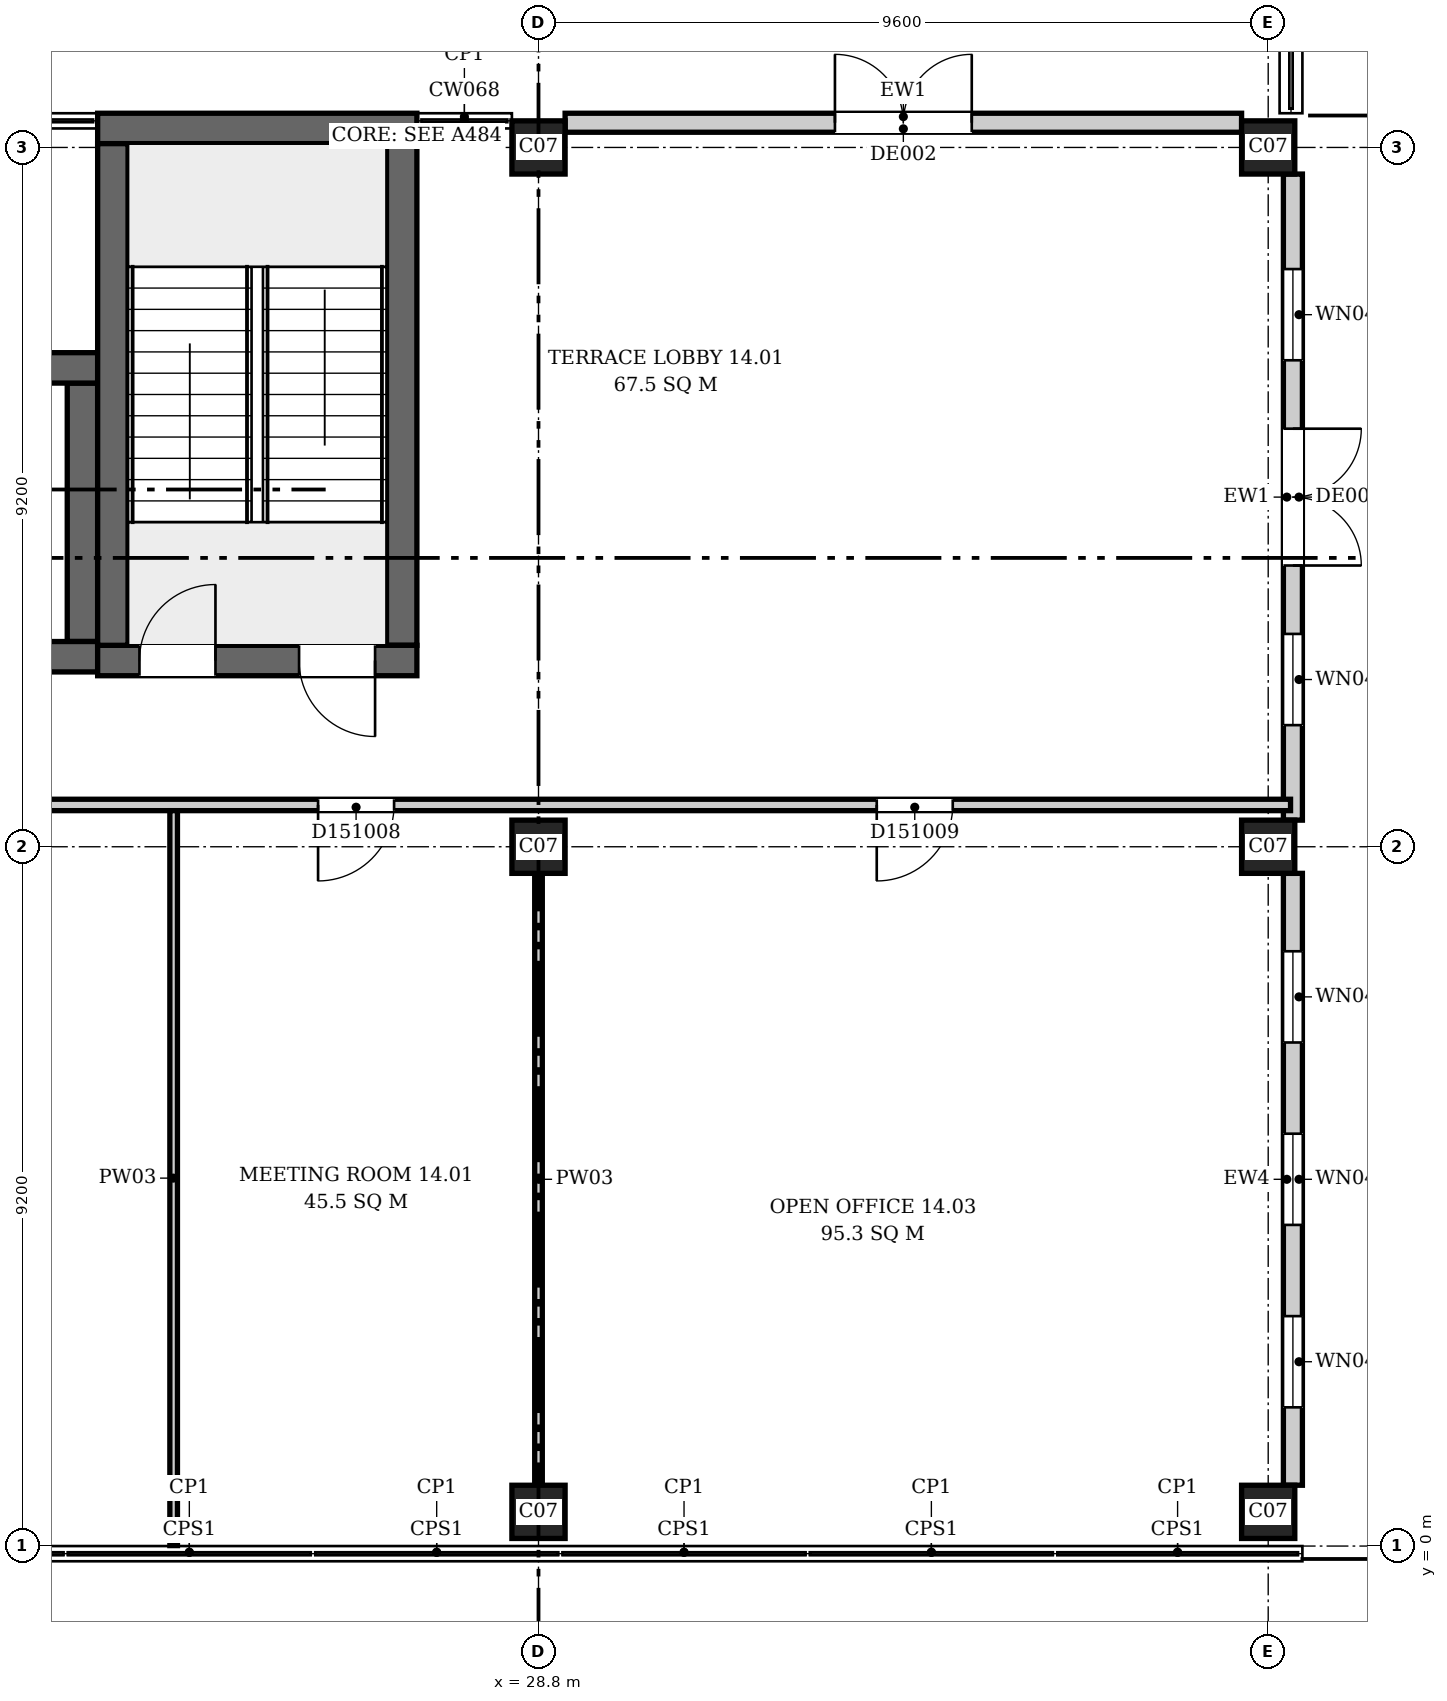
"""IFC4 building model, lengths in metres.
Left out: names, types, materials, properties, quantities, classifications, styles, units other than length and angle.
Written with IfcOpenShell. Run it as: python <this file> out.ifc"""

import sys

from ifc_helpers import new_model, si_unit, direction, frame, frame_2d, origin, origin_2d, place, context, subcontext, project, spatial, rectangle, extrude, element, fill, save


model = new_model("IFC4")
c1 = context("Model", 3, precision=1e-05, world=origin(), true_north=direction((0.0, 1.0)))
c2 = subcontext(c1, "Body", "Model", "MODEL_VIEW")
j1 = project(units=[si_unit("LENGTHUNIT", "METRE"), si_unit("PLANEANGLEUNIT", "RADIAN")], contexts=[c1])
p1 = place(None, origin())
s1 = spatial("IfcSite", under=j1, at=p1, CompositionType="ELEMENT")
p2 = place(p1, origin())
s2 = spatial("IfcBuilding", under=s1, at=p2, CompositionType="ELEMENT")
p3 = place(p2, frame((0.0, 0.0, 69.7)))
s3 = spatial("IfcBuildingStorey", under=s2, at=p3, CompositionType="ELEMENT", Elevation=69.7)
p4 = place(p3, frame((23.0, 11.65, 0.0), z_axis=(0.0, 0.0, 1.0), x_axis=(1.0, 0.0, 0.0)))
e1 = element("IfcWall", 1, at=p4, inside=s3, PredefinedType="SHEAR", context=c2, shape_type="SweptSolid", body=[
    extrude(rectangle(XDim=4.2, YDim=0.4, at=frame_2d((2.1, 0.0))), origin(), (0.0, 0.0, 1.0), 4.2),
])
p5 = place(p4, frame((0.55, 0.0, 0.0)))
e2 = element("IfcOpeningElement", 2, at=p5, cuts=e1, PredefinedType="OPENING", context=c2, shape_type="SweptSolid", body=[
    extrude(rectangle(XDim=1.0, YDim=2.1, at=frame_2d((0.5, 1.05))), frame((0.0, 0.21, 0.0), z_axis=(0.0, -1.0, 0.0), x_axis=(1.0, 0.0, 0.0)), (0.0, 0.0, 1.0), 0.42),
])
p6 = place(p4, frame((2.65, 0.0, 0.0)))
e3 = element("IfcOpeningElement", 3, at=p6, cuts=e1, PredefinedType="OPENING", context=c2, shape_type="SweptSolid", body=[
    extrude(rectangle(XDim=1.0, YDim=2.1, at=frame_2d((0.5, 1.05))), frame((0.0, 0.21, 0.0), z_axis=(0.0, -1.0, 0.0), x_axis=(1.0, 0.0, 0.0)), (0.0, 0.0, 1.0), 0.42),
])
p7 = place(p3, frame((23.0, 18.65, 0.0), z_axis=(0.0, 0.0, 1.0), x_axis=(1.0, 0.0, 0.0)))
e4 = element("IfcWall", 4, at=p7, inside=s3, PredefinedType="SHEAR", context=c2, shape_type="SweptSolid", body=[
    extrude(rectangle(XDim=4.2, YDim=0.4, at=frame_2d((2.1, 0.0))), origin(), (0.0, 0.0, 1.0), 4.2),
])
for number, where, z_axis, x_axis in (
    (5, (23.2, 11.85, 0.0), (0.0, 0.0, 1.0), (0.0, 1.0, 0.0)),
    (6, (27.0, 11.85, 0.0), (0.0, 0.0, 1.0), (0.0, 1.0, 0.0)),
):
    element("IfcWall", number, at=place(p3, frame(where, z_axis=z_axis, x_axis=x_axis)), inside=s3, PredefinedType="SHEAR", context=c2, shape_type="SweptSolid", body=[
        extrude(rectangle(XDim=6.6, YDim=0.4, at=frame_2d((3.3, 0.0))), origin(), (0.0, 0.0, 1.0), 4.2),
    ])
p8 = place(p3, frame((19.9, 11.7, 0.0), z_axis=(0.0, 0.0, 1.0), x_axis=(1.0, 0.0, 0.0)))
e7 = element("IfcWall", 7, at=p8, inside=s3, PredefinedType="SHEAR", context=c2, shape_type="SweptSolid", body=[
    extrude(rectangle(XDim=3.1, YDim=0.4, at=frame_2d((1.55, 0.0))), origin(), (0.0, 0.0, 1.0), 4.2),
])
p9 = place(p3, frame((19.9, 15.5, 0.0), z_axis=(0.0, 0.0, 1.0), x_axis=(1.0, 0.0, 0.0)))
e8 = element("IfcWall", 8, at=p9, inside=s3, PredefinedType="SHEAR", context=c2, shape_type="SweptSolid", body=[
    extrude(rectangle(XDim=3.1, YDim=0.4, at=frame_2d((1.55, 0.0))), origin(), (0.0, 0.0, 1.0), 4.2),
])
p10 = place(p9, frame((0.95, 0.0, 0.0)))
e9 = element("IfcOpeningElement", 9, at=p10, cuts=e8, PredefinedType="OPENING", context=c2, shape_type="SweptSolid", body=[
    extrude(rectangle(XDim=1.2, YDim=2.1, at=frame_2d((0.6, 1.05))), frame((0.0, 0.21, 0.0), z_axis=(0.0, -1.0, 0.0), x_axis=(1.0, 0.0, 0.0)), (0.0, 0.0, 1.0), 0.42),
])
p11 = place(p3, frame((22.8, 11.9, 0.0), z_axis=(0.0, 0.0, 1.0), x_axis=(0.0, 1.0, 0.0)))
e10 = element("IfcWall", 10, at=p11, inside=s3, PredefinedType="SHEAR", context=c2, shape_type="SweptSolid", body=[
    extrude(rectangle(XDim=3.4, YDim=0.4, at=frame_2d((1.7, 0.0))), origin(), (0.0, 0.0, 1.0), 4.2),
])
for number, where, z_axis, x_axis in (
    (11, (28.8, 0.45, 0.0), (0.0, 0.0, 1.0), (1.0, 0.0, 0.0)),
    (12, (38.4, 0.45, 0.0), (0.0, 0.0, 1.0), (1.0, 0.0, 0.0)),
    (13, (28.8, 9.2, 0.0), (0.0, 0.0, 1.0), (1.0, 0.0, 0.0)),
    (14, (38.4, 9.2, 0.0), (0.0, 0.0, 1.0), (1.0, 0.0, 0.0)),
    (15, (28.8, 18.4, 0.0), (0.0, 0.0, 1.0), (1.0, 0.0, 0.0)),
    (16, (38.4, 18.4, 0.0), (0.0, 0.0, 1.0), (1.0, 0.0, 0.0)),
):
    element("IfcColumn", number, at=place(p3, frame(where, z_axis=z_axis, x_axis=x_axis)), inside=s3, PredefinedType="COLUMN", context=c2, shape_type="SweptSolid", body=[
        extrude(rectangle(XDim=0.7, YDim=0.7, at=origin_2d()), origin(), (0.0, 0.0, 1.0), 4.2),
    ])
p12 = place(p3, frame((38.05, 18.725, 0.0), z_axis=(0.0, 0.0, 1.0), x_axis=(-1.0, 0.0, 0.0)))
e17 = element("IfcWall", 17, at=p12, inside=s3, PredefinedType="ELEMENTEDWALL", context=c2, shape_type="SweptSolid", body=[
    extrude(rectangle(XDim=8.9, YDim=0.25, at=frame_2d((4.45, 0.0))), origin(), (0.0, 0.0, 1.0), 3.9),
])
p13 = place(p12, frame((3.55, 0.0, 0.0)))
e18 = element("IfcOpeningElement", 18, at=p13, cuts=e17, PredefinedType="OPENING", context=c2, shape_type="SweptSolid", body=[
    extrude(rectangle(XDim=1.8, YDim=2.4, at=frame_2d((0.9, 1.2))), frame((0.0, 0.135, 0.0), z_axis=(0.0, -1.0, 0.0), x_axis=(1.0, 0.0, 0.0)), (0.0, 0.0, 1.0), 0.27),
])
p14 = place(p3, frame((38.725, 0.8, 0.0), z_axis=(0.0, 0.0, 1.0), x_axis=(0.0, 1.0, 0.0)))
e19 = element("IfcWall", 19, at=p14, inside=s3, PredefinedType="ELEMENTEDWALL", context=c2, shape_type="SweptSolid", body=[
    extrude(rectangle(XDim=8.05, YDim=0.25, at=frame_2d((4.025, 0.0))), origin(), (0.0, 0.0, 1.0), 3.9),
])
p15 = place(p14, frame((1.025, 0.0, 0.9)))
e20 = element("IfcOpeningElement", 20, at=p15, cuts=e19, PredefinedType="OPENING", context=c2, shape_type="SweptSolid", body=[
    extrude(rectangle(XDim=1.2, YDim=2.6, at=frame_2d((0.6, 1.3))), frame((0.0, 0.135, 0.0), z_axis=(0.0, -1.0, 0.0), x_axis=(1.0, 0.0, 0.0)), (0.0, 0.0, 1.0), 0.27),
])
p16 = place(p14, frame((3.425, 0.0, 0.9)))
e21 = element("IfcOpeningElement", 21, at=p16, cuts=e19, PredefinedType="OPENING", context=c2, shape_type="SweptSolid", body=[
    extrude(rectangle(XDim=1.2, YDim=2.6, at=frame_2d((0.6, 1.3))), frame((0.0, 0.135, 0.0), z_axis=(0.0, -1.0, 0.0), x_axis=(1.0, 0.0, 0.0)), (0.0, 0.0, 1.0), 0.27),
])
p17 = place(p14, frame((5.825, 0.0, 0.9)))
e22 = element("IfcOpeningElement", 22, at=p17, cuts=e19, PredefinedType="OPENING", context=c2, shape_type="SweptSolid", body=[
    extrude(rectangle(XDim=1.2, YDim=2.6, at=frame_2d((0.6, 1.3))), frame((0.0, 0.135, 0.0), z_axis=(0.0, -1.0, 0.0), x_axis=(1.0, 0.0, 0.0)), (0.0, 0.0, 1.0), 0.27),
])
p18 = place(p3, frame((38.725, 9.55, 0.0), z_axis=(0.0, 0.0, 1.0), x_axis=(0.0, 1.0, 0.0)))
e23 = element("IfcWall", 23, at=p18, inside=s3, PredefinedType="ELEMENTEDWALL", context=c2, shape_type="SweptSolid", body=[
    extrude(rectangle(XDim=8.5, YDim=0.25, at=frame_2d((4.25, 0.0))), origin(), (0.0, 0.0, 1.0), 3.9),
])
p19 = place(p18, frame((3.35, 0.0, 0.0)))
e24 = element("IfcOpeningElement", 24, at=p19, cuts=e23, PredefinedType="OPENING", context=c2, shape_type="SweptSolid", body=[
    extrude(rectangle(XDim=1.8, YDim=2.4, at=frame_2d((0.9, 1.2))), frame((0.0, 0.135, 0.0), z_axis=(0.0, -1.0, 0.0), x_axis=(1.0, 0.0, 0.0)), (0.0, 0.0, 1.0), 0.27),
])
p20 = place(p18, frame((1.25, 0.0, 0.9)))
e25 = element("IfcOpeningElement", 25, at=p20, cuts=e23, PredefinedType="OPENING", context=c2, shape_type="SweptSolid", body=[
    extrude(rectangle(XDim=1.2, YDim=2.6, at=frame_2d((0.6, 1.3))), frame((0.0, 0.135, 0.0), z_axis=(0.0, -1.0, 0.0), x_axis=(1.0, 0.0, 0.0)), (0.0, 0.0, 1.0), 0.27),
])
p21 = place(p18, frame((6.05, 0.0, 0.9)))
e26 = element("IfcOpeningElement", 26, at=p21, cuts=e23, PredefinedType="OPENING", context=c2, shape_type="SweptSolid", body=[
    extrude(rectangle(XDim=1.2, YDim=2.6, at=frame_2d((0.6, 1.3))), frame((0.0, 0.135, 0.0), z_axis=(0.0, -1.0, 0.0), x_axis=(1.0, 0.0, 0.0)), (0.0, 0.0, 1.0), 0.27),
])
p22 = place(p3, frame((4.325, 9.75, 0.0), z_axis=(0.0, 0.0, 1.0), x_axis=(1.0, 0.0, 0.0)))
e27 = element("IfcWall", 27, at=p22, inside=s3, PredefinedType="PARTITIONING", context=c2, shape_type="SweptSolid", body=[
    extrude(rectangle(XDim=34.369, YDim=0.15, at=frame_2d((17.185, 0.0))), origin(), (0.0, 0.0, 1.0), 3.9),
])
p23 = place(p22, frame((2.175, 0.0, 0.0)))
e28 = element("IfcOpeningElement", 28, at=p23, cuts=e27, PredefinedType="OPENING", context=c2, shape_type="SweptSolid", body=[
    extrude(rectangle(XDim=1.0, YDim=2.1, at=frame_2d((0.5, 1.05))), frame((0.0, 0.085, 0.0), z_axis=(0.0, -1.0, 0.0), x_axis=(1.0, 0.0, 0.0)), (0.0, 0.0, 1.0), 0.17),
])
p24 = place(p22, frame((11.975, 0.0, 0.0)))
e29 = element("IfcOpeningElement", 29, at=p24, cuts=e27, PredefinedType="OPENING", context=c2, shape_type="SweptSolid", body=[
    extrude(rectangle(XDim=1.0, YDim=2.1, at=frame_2d((0.5, 1.05))), frame((0.0, 0.085, 0.0), z_axis=(0.0, -1.0, 0.0), x_axis=(1.0, 0.0, 0.0)), (0.0, 0.0, 1.0), 0.17),
])
p25 = place(p22, frame((21.575, 0.0, 0.0)))
e30 = element("IfcOpeningElement", 30, at=p25, cuts=e27, PredefinedType="OPENING", context=c2, shape_type="SweptSolid", body=[
    extrude(rectangle(XDim=1.0, YDim=2.1, at=frame_2d((0.5, 1.05))), frame((0.0, 0.085, 0.0), z_axis=(0.0, -1.0, 0.0), x_axis=(1.0, 0.0, 0.0)), (0.0, 0.0, 1.0), 0.17),
])
p26 = place(p22, frame((28.925, 0.0, 0.0)))
e31 = element("IfcOpeningElement", 31, at=p26, cuts=e27, PredefinedType="OPENING", context=c2, shape_type="SweptSolid", body=[
    extrude(rectangle(XDim=1.0, YDim=2.1, at=frame_2d((0.5, 1.05))), frame((0.0, 0.085, 0.0), z_axis=(0.0, -1.0, 0.0), x_axis=(1.0, 0.0, 0.0)), (0.0, 0.0, 1.0), 0.17),
])
p27 = place(p3, frame((24.0, 0.006, 0.0), z_axis=(0.0, 0.0, 1.0), x_axis=(0.0, 1.0, 0.0)))
e32 = element("IfcWall", 32, at=p27, inside=s3, PredefinedType="PARTITIONING", context=c2, shape_type="SweptSolid", body=[
    extrude(rectangle(XDim=9.669, YDim=0.1, at=frame_2d((4.834, 0.0))), origin(), (0.0, 0.0, 1.0), 3.9),
])
p28 = place(p3, frame((28.8, 0.8, 0.0), z_axis=(0.0, 0.0, 1.0), x_axis=(0.0, 1.0, 0.0)))
e33 = element("IfcWall", 33, at=p28, inside=s3, PredefinedType="PARTITIONING", context=c2, shape_type="SweptSolid", body=[
    extrude(rectangle(XDim=8.05, YDim=0.1, at=frame_2d((4.025, 0.0))), origin(), (0.0, 0.0, 1.0), 3.9),
])
p29 = place(p13, frame((1.8, 0.0, 0.0), z_axis=(0.0, 0.0, 1.0), x_axis=(-1.0, 0.0, 0.0)))
e34 = element("IfcDoor", 34, at=p29, inside=s3, OperationType="DOUBLE_DOOR_SINGLE_SWING", PredefinedType="DOOR", context=c2, shape_type="SweptSolid", body=[
    extrude(rectangle(XDim=1.8, YDim=2.4, at=frame_2d((0.9, 1.2))), frame((0.0, 0.025, 0.0), z_axis=(0.0, -1.0, 0.0), x_axis=(1.0, 0.0, 0.0)), (0.0, 0.0, 1.0), 0.05),
])
fill(e18, e34)
p30 = place(p15, origin())
e35 = element("IfcWindow", 35, at=p30, inside=s3, PartitioningType="SINGLE_PANEL", PredefinedType="WINDOW", context=c2, shape_type="SweptSolid", body=[
    extrude(rectangle(XDim=1.2, YDim=2.6, at=frame_2d((0.6, 1.3))), frame((0.0, 0.03, 0.0), z_axis=(0.0, -1.0, 0.0), x_axis=(1.0, 0.0, 0.0)), (0.0, 0.0, 1.0), 0.06),
])
fill(e20, e35)
p31 = place(p16, origin())
e36 = element("IfcWindow", 36, at=p31, inside=s3, PartitioningType="SINGLE_PANEL", PredefinedType="WINDOW", context=c2, shape_type="SweptSolid", body=[
    extrude(rectangle(XDim=1.2, YDim=2.6, at=frame_2d((0.6, 1.3))), frame((0.0, 0.03, 0.0), z_axis=(0.0, -1.0, 0.0), x_axis=(1.0, 0.0, 0.0)), (0.0, 0.0, 1.0), 0.06),
])
fill(e21, e36)
p32 = place(p17, origin())
e37 = element("IfcWindow", 37, at=p32, inside=s3, PartitioningType="SINGLE_PANEL", PredefinedType="WINDOW", context=c2, shape_type="SweptSolid", body=[
    extrude(rectangle(XDim=1.2, YDim=2.6, at=frame_2d((0.6, 1.3))), frame((0.0, 0.03, 0.0), z_axis=(0.0, -1.0, 0.0), x_axis=(1.0, 0.0, 0.0)), (0.0, 0.0, 1.0), 0.06),
])
fill(e22, e37)
p33 = place(p19, frame((1.8, 0.0, 0.0), z_axis=(0.0, 0.0, 1.0), x_axis=(-1.0, 0.0, 0.0)))
e38 = element("IfcDoor", 38, at=p33, inside=s3, OperationType="DOUBLE_DOOR_SINGLE_SWING", PredefinedType="DOOR", context=c2, shape_type="SweptSolid", body=[
    extrude(rectangle(XDim=1.8, YDim=2.4, at=frame_2d((0.9, 1.2))), frame((0.0, 0.025, 0.0), z_axis=(0.0, -1.0, 0.0), x_axis=(1.0, 0.0, 0.0)), (0.0, 0.0, 1.0), 0.05),
])
fill(e24, e38)
p34 = place(p20, origin())
e39 = element("IfcWindow", 39, at=p34, inside=s3, PartitioningType="SINGLE_PANEL", PredefinedType="WINDOW", context=c2, shape_type="SweptSolid", body=[
    extrude(rectangle(XDim=1.2, YDim=2.6, at=frame_2d((0.6, 1.3))), frame((0.0, 0.03, 0.0), z_axis=(0.0, -1.0, 0.0), x_axis=(1.0, 0.0, 0.0)), (0.0, 0.0, 1.0), 0.06),
])
fill(e25, e39)
p35 = place(p21, origin())
e40 = element("IfcWindow", 40, at=p35, inside=s3, PartitioningType="SINGLE_PANEL", PredefinedType="WINDOW", context=c2, shape_type="SweptSolid", body=[
    extrude(rectangle(XDim=1.2, YDim=2.6, at=frame_2d((0.6, 1.3))), frame((0.0, 0.03, 0.0), z_axis=(0.0, -1.0, 0.0), x_axis=(1.0, 0.0, 0.0)), (0.0, 0.0, 1.0), 0.06),
])
fill(e26, e40)
p36 = place(p5, origin())
e41 = element("IfcDoor", 41, at=p36, inside=s3, OperationType="SINGLE_SWING_RIGHT", PredefinedType="DOOR", context=c2, shape_type="SweptSolid", body=[
    extrude(rectangle(XDim=1.0, YDim=2.1, at=frame_2d((0.5, 1.05))), frame((0.0, 0.025, 0.0), z_axis=(0.0, -1.0, 0.0), x_axis=(1.0, 0.0, 0.0)), (0.0, 0.0, 1.0), 0.05),
])
fill(e2, e41)
p37 = place(p6, origin())
e42 = element("IfcDoor", 42, at=p37, inside=s3, OperationType="SINGLE_SWING_LEFT", PredefinedType="DOOR", context=c2, shape_type="SweptSolid", body=[
    extrude(rectangle(XDim=1.0, YDim=2.1, at=frame_2d((0.5, 1.05))), frame((0.0, 0.025, 0.0), z_axis=(0.0, -1.0, 0.0), x_axis=(1.0, 0.0, 0.0)), (0.0, 0.0, 1.0), 0.05),
])
fill(e3, e42)
p38 = place(p25, origin())
e43 = element("IfcDoor", 43, at=p38, inside=s3, OperationType="SINGLE_SWING_LEFT", PredefinedType="DOOR", context=c2, shape_type="SweptSolid", body=[
    extrude(rectangle(XDim=1.0, YDim=2.1, at=frame_2d((0.5, 1.05))), frame((0.0, 0.025, 0.0), z_axis=(0.0, -1.0, 0.0), x_axis=(1.0, 0.0, 0.0)), (0.0, 0.0, 1.0), 0.05),
])
fill(e30, e43)
p39 = place(p26, origin())
e44 = element("IfcDoor", 44, at=p39, inside=s3, OperationType="SINGLE_SWING_LEFT", PredefinedType="DOOR", context=c2, shape_type="SweptSolid", body=[
    extrude(rectangle(XDim=1.0, YDim=2.1, at=frame_2d((0.5, 1.05))), frame((0.0, 0.025, 0.0), z_axis=(0.0, -1.0, 0.0), x_axis=(1.0, 0.0, 0.0)), (0.0, 0.0, 1.0), 0.05),
])
fill(e31, e44)
save(model, sys.argv[1])
